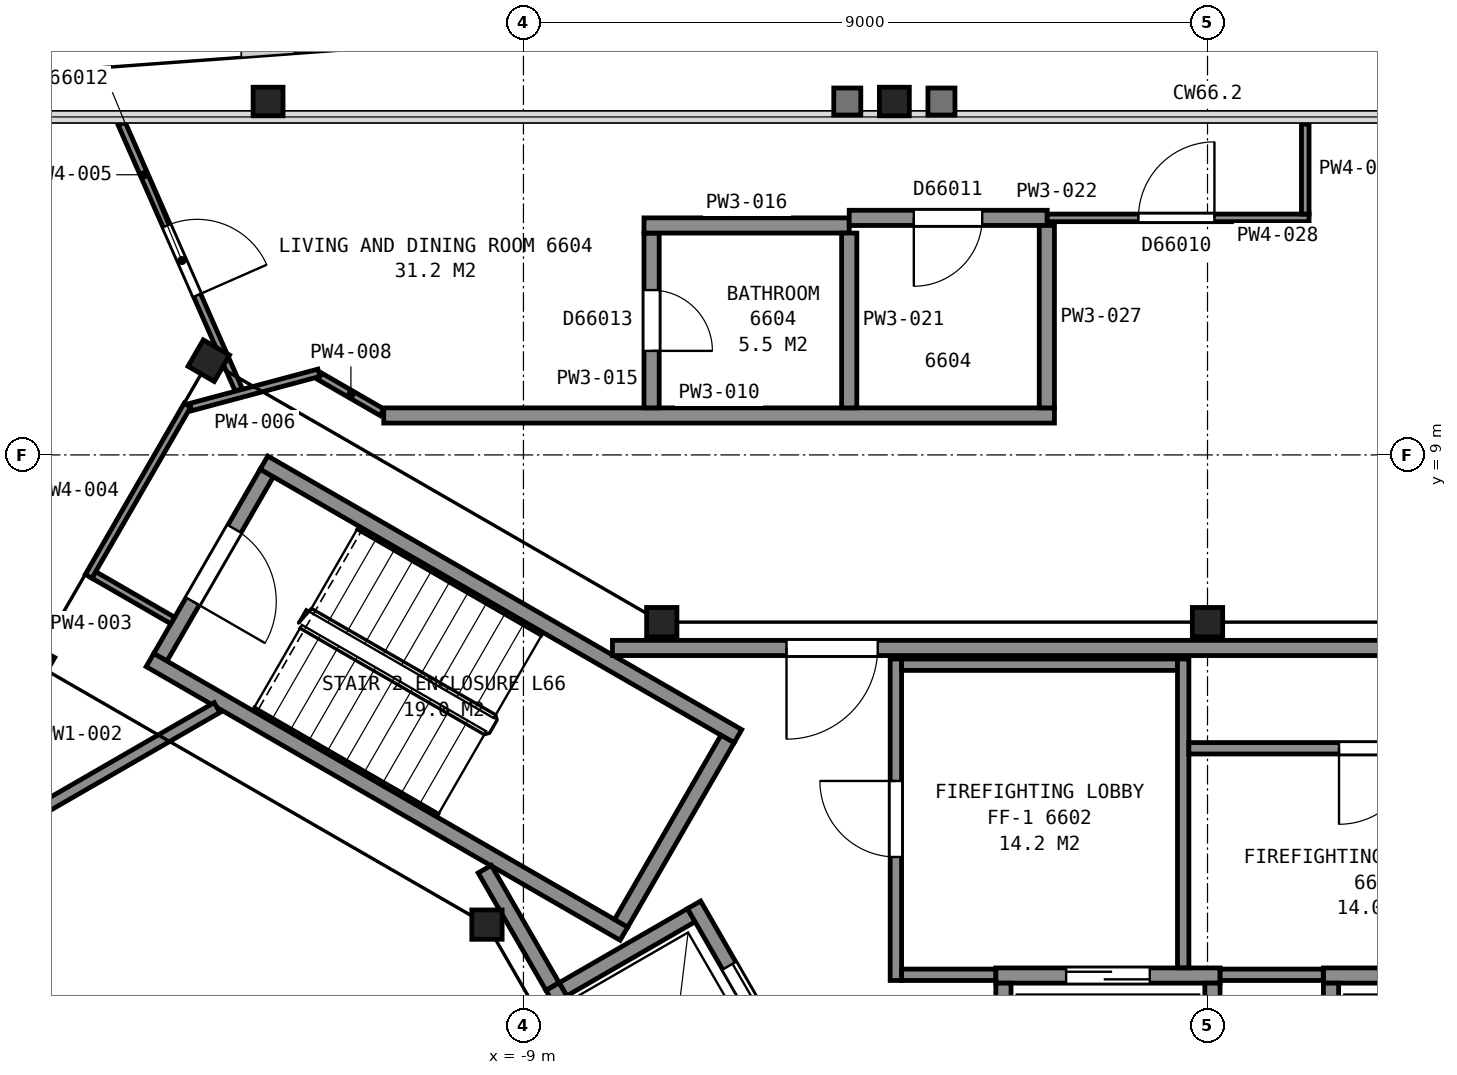
"""IFC4 building model, lengths in metres.
Left out: names, types, materials, properties, quantities, classifications, styles, units other than length and angle.
Written with IfcOpenShell. Run it as: python <this file> out.ifc"""

import sys

from ifc_helpers import new_model, si_unit, direction, frame, frame_2d, origin, origin_2d, place, context, subcontext, project, spatial, rectangle, i_section, extrude, element, fill, save


model = new_model("IFC4")
c1 = context("Model", 3, precision=1e-05, world=origin(), true_north=direction((0.0, 1.0)))
c2 = subcontext(c1, "Body", "Model", "MODEL_VIEW")
j1 = project(units=[si_unit("LENGTHUNIT", "METRE"), si_unit("PLANEANGLEUNIT", "RADIAN")], contexts=[c1])
p1 = place(None, origin())
s1 = spatial("IfcSite", under=j1, at=p1, CompositionType="ELEMENT")
p2 = place(p1, origin())
s2 = spatial("IfcBuilding", under=s1, at=p2, CompositionType="ELEMENT")
p3 = place(p2, frame((0.0, 0.0, 264.0)))
s3 = spatial("IfcBuildingStorey", under=s2, at=p3, CompositionType="ELEMENT", Elevation=264.0)
for number, where, z_axis, x_axis in (
    (1, (-4.12, 13.65, 0.0), (0.0, 0.0, 1.0), (1.0, 0.0, 0.0)),
    (2, (-12.36, 13.65, 0.0), (0.0, 0.0, 1.0), (1.0, 0.0, 0.0)),
):
    element("IfcColumn", number, at=place(p3, frame(where, z_axis=z_axis, x_axis=x_axis)), inside=s3, PredefinedType="COLUMN", context=c2, shape_type="SweptSolid", body=[
        extrude(i_section(OverallWidth=0.394, OverallDepth=0.376, WebThickness=0.017, FlangeThickness=0.028, FilletRadius=0.015, at=origin_2d()), origin(), (0.0, 0.0, 1.0), 3.7),
    ])
p4 = place(p3, frame((0.0, 6.8, 0.03), z_axis=(0.0, 0.0, 1.0), x_axis=(1.0, 0.0, 0.0)))
e3 = element("IfcColumn", 3, at=p4, inside=s3, PredefinedType="COLUMN", context=c2, shape_type="SweptSolid", body=[
    extrude(i_section(OverallWidth=0.399, OverallDepth=0.386, WebThickness=0.021, FlangeThickness=0.033, FilletRadius=0.015, at=origin_2d()), origin(), (0.0, 0.0, 1.0), 3.67),
])
p5 = place(p3, frame((-7.18, 6.8, 0.065), z_axis=(0.0, 0.0, 1.0), x_axis=(1.0, 0.0, 0.0)))
e4 = element("IfcColumn", 4, at=p5, inside=s3, PredefinedType="COLUMN", context=c2, shape_type="SweptSolid", body=[
    extrude(i_section(OverallWidth=0.399, OverallDepth=0.386, WebThickness=0.021, FlangeThickness=0.033, FilletRadius=0.015, at=origin_2d()), origin(), (0.0, 0.0, 1.0), 3.635),
])
for number, where, z_axis, x_axis in (
    (5, (-13.14, 10.24, 0.05), (0.0, 0.0, 1.0), (0.5, 0.866, 0.0)),
    (6, (-15.44, 6.26, 0.05), (0.0, 0.0, 1.0), (0.5, 0.866, 0.0)),
):
    element("IfcColumn", number, at=place(p3, frame(where, z_axis=z_axis, x_axis=x_axis)), inside=s3, PredefinedType="COLUMN", context=c2, shape_type="SweptSolid", body=[
        extrude(i_section(OverallWidth=0.401, OverallDepth=0.399, WebThickness=0.025, FlangeThickness=0.04, FilletRadius=0.015, at=origin_2d()), origin(), (0.0, 0.0, 1.0), 3.65),
    ])
p6 = place(p3, frame((-9.48, 2.82, 0.065), z_axis=(0.0, 0.0, 1.0), x_axis=(1.0, 0.0, 0.0)))
e7 = element("IfcColumn", 7, at=p6, inside=s3, PredefinedType="COLUMN", context=c2, shape_type="SweptSolid", body=[
    extrude(i_section(OverallWidth=0.399, OverallDepth=0.386, WebThickness=0.021, FlangeThickness=0.033, FilletRadius=0.015, at=origin_2d()), origin(), (0.0, 0.0, 1.0), 3.635),
])
p7 = place(p3, frame((-12.377, 8.762, 0.0), z_axis=(0.0, 0.0, 1.0), x_axis=(-0.500049511043, -0.865996816683, 0.0)))
e8 = element("IfcWall", 8, at=p7, inside=s3, PredefinedType="PARTITIONING", context=c2, shape_type="SweptSolid", body=[
    extrude(rectangle(XDim=2.8, YDim=0.2, at=frame_2d((1.4, 0.0))), origin(), (0.0, 0.0, 1.0), 3.45),
])
p8 = place(p7, frame((0.85, 0.0, 0.0)))
e9 = element("IfcOpeningElement", 9, at=p8, cuts=e8, PredefinedType="OPENING", context=c2, shape_type="SweptSolid", body=[
    extrude(rectangle(XDim=1.1, YDim=2.1, at=frame_2d((0.55, 1.05))), frame((0.0, 0.11, 0.0), z_axis=(0.0, -1.0, 0.0), x_axis=(1.0, 0.0, 0.0)), (0.0, 0.0, 1.0), 0.22),
])
for number, where, z_axis, x_axis in (
    (10, (-7.678, 2.701, 0.0), (0.0, 0.0, 1.0), (-0.866, 0.5, 0.0)),
    (11, (-6.178, 5.299, 0.0), (0.0, 0.0, 1.0), (-0.866, 0.5, 0.0)),
):
    element("IfcWall", number, at=place(p3, frame(where, z_axis=z_axis, x_axis=x_axis)), inside=s3, PredefinedType="PARTITIONING", context=c2, shape_type="SweptSolid", body=[
        extrude(rectangle(XDim=7.2, YDim=0.2, at=frame_2d((3.6, 0.0))), origin(), (0.0, 0.0, 1.0), 3.45),
    ])
p9 = place(p3, frame((-6.315, 5.262, 0.0), z_axis=(0.0, 0.0, 1.0), x_axis=(-0.500049511043, -0.865996816683, 0.0)))
e12 = element("IfcWall", 12, at=p9, inside=s3, PredefinedType="PARTITIONING", context=c2, shape_type="SweptSolid", body=[
    extrude(rectangle(XDim=2.8, YDim=0.2, at=frame_2d((1.4, 0.0))), origin(), (0.0, 0.0, 1.0), 3.45),
])
p10 = place(p3, frame((-2.785, 2.15, 0.0), z_axis=(0.0, 0.0, 1.0), x_axis=(1.0, 0.0, 0.0)))
e13 = element("IfcWall", 13, at=p10, inside=s3, PredefinedType="PARTITIONING", context=c2, shape_type="SweptSolid", body=[
    extrude(rectangle(XDim=2.95, YDim=0.2, at=frame_2d((1.475, 0.0))), origin(), (0.0, 0.0, 1.0), 3.7),
])
p11 = place(p10, frame((0.925, 0.0, 0.0)))
e14 = element("IfcOpeningElement", 14, at=p11, cuts=e13, PredefinedType="OPENING", context=c2, shape_type="SweptSolid", body=[
    extrude(rectangle(XDim=1.1, YDim=2.1, at=frame_2d((0.55, 1.05))), frame((0.0, 0.11, 0.0), z_axis=(0.0, -1.0, 0.0), x_axis=(1.0, 0.0, 0.0)), (0.0, 0.0, 1.0), 0.22),
])
p12 = place(p3, frame((1.525, 2.15, 0.0), z_axis=(0.0, 0.0, 1.0), x_axis=(1.0, 0.0, 0.0)))
e15 = element("IfcWall", 15, at=p12, inside=s3, PredefinedType="PARTITIONING", context=c2, shape_type="SweptSolid", body=[
    extrude(rectangle(XDim=2.95, YDim=0.2, at=frame_2d((1.475, 0.0))), origin(), (0.0, 0.0, 1.0), 3.7),
])
p13 = place(p12, frame((0.925, 0.0, 0.0)))
e16 = element("IfcOpeningElement", 16, at=p13, cuts=e15, PredefinedType="OPENING", context=c2, shape_type="SweptSolid", body=[
    extrude(rectangle(XDim=1.1, YDim=2.1, at=frame_2d((0.55, 1.05))), frame((0.0, 0.11, 0.0), z_axis=(0.0, -1.0, 0.0), x_axis=(1.0, 0.0, 0.0)), (0.0, 0.0, 1.0), 0.22),
])
for number, where, z_axis, x_axis in (
    (17, (-8.48, 1.969, 0.0), (0.0, 0.0, 1.0), (0.866, 0.5, 0.0)),
    (18, (1.625, 0.1, 0.0), (0.0, 0.0, 1.0), (0.0, 1.0, 0.0)),
    (19, (0.065, 0.1, 0.0), (0.0, 0.0, 1.0), (0.0, 1.0, 0.0)),
    (20, (-2.685, 0.1, 0.0), (0.0, 0.0, 1.0), (0.0, 1.0, 0.0)),
):
    element("IfcWall", number, at=place(p3, frame(where, z_axis=z_axis, x_axis=x_axis)), inside=s3, PredefinedType="PARTITIONING", context=c2, shape_type="SweptSolid", body=[
        extrude(rectangle(XDim=1.95, YDim=0.2, at=frame_2d((0.975, 0.0))), origin(), (0.0, 0.0, 1.0), 3.7),
    ])
p14 = place(p3, frame((-5.28, 0.525, 0.0), z_axis=(0.0, 0.0, 1.0), x_axis=(-0.500037662692, 0.866003658127, 0.0)))
e21 = element("IfcWall", 21, at=p14, inside=s3, PredefinedType="PARTITIONING", context=c2, shape_type="SweptSolid", body=[
    extrude(rectangle(XDim=2.95, YDim=0.2, at=frame_2d((1.475, 0.0))), origin(), (0.0, 0.0, 1.0), 3.7),
])
p15 = place(p14, frame((0.925, 0.0, 0.0)))
e22 = element("IfcOpeningElement", 22, at=p15, cuts=e21, PredefinedType="OPENING", context=c2, shape_type="SweptSolid", body=[
    extrude(rectangle(XDim=1.1, YDim=2.1, at=frame_2d((0.55, 1.05))), frame((0.0, 0.11, 0.0), z_axis=(0.0, -1.0, 0.0), x_axis=(1.0, 0.0, 0.0)), (0.0, 0.0, 1.0), 0.22),
])
p16 = place(p3, frame((-7.142, -0.55, 0.0), z_axis=(0.0, 0.0, 1.0), x_axis=(-0.49997559174, 0.866039495442, 0.0)))
e23 = element("IfcWall", 23, at=p16, inside=s3, PredefinedType="PARTITIONING", context=c2, shape_type="SweptSolid", body=[
    extrude(rectangle(XDim=2.95, YDim=0.2, at=frame_2d((1.475, 0.0))), origin(), (0.0, 0.0, 1.0), 3.7),
])
p17 = place(p3, frame((-9.509, 3.551, 0.0), z_axis=(0.0, 0.0, 1.0), x_axis=(0.499999136801, -0.866025902152, 0.0)))
e24 = element("IfcWall", 24, at=p17, inside=s3, PredefinedType="PARTITIONING", context=c2, shape_type="SweptSolid", body=[
    extrude(rectangle(XDim=1.782, YDim=0.2, at=frame_2d((0.891, 0.0))), origin(), (0.0, 0.0, 1.0), 3.45),
])
p18 = place(p3, frame((7.829, 6.46, 0.0), z_axis=(0.0, 0.0, 1.0), x_axis=(-1.0, 0.0, 0.0)))
e25 = element("IfcWall", 25, at=p18, inside=s3, PredefinedType="PARTITIONING", context=c2, shape_type="SweptSolid", body=[
    extrude(rectangle(XDim=15.658, YDim=0.2, at=frame_2d((7.829, 0.0))), origin(), (0.0, 0.0, 1.0), 3.45),
])
p19 = place(p18, frame((12.168, 0.0, 0.0)))
e26 = element("IfcOpeningElement", 26, at=p19, cuts=e25, PredefinedType="OPENING", context=c2, shape_type="SweptSolid", body=[
    extrude(rectangle(XDim=1.2, YDim=2.1, at=frame_2d((0.6, 1.05))), frame((0.0, 0.11, 0.0), z_axis=(0.0, -1.0, 0.0), x_axis=(1.0, 0.0, 0.0)), (0.0, 0.0, 1.0), 0.22),
])
p20 = place(p3, frame((-4.1, 2.085, 0.0), z_axis=(0.0, 0.0, 1.0), x_axis=(0.0, 1.0, 0.0)))
e27 = element("IfcWall", 27, at=p20, inside=s3, PredefinedType="PARTITIONING", context=c2, shape_type="SweptSolid", body=[
    extrude(rectangle(XDim=4.23, YDim=0.15, at=frame_2d((2.115, 0.0))), origin(), (0.0, 0.0, 1.0), 3.45),
])
p21 = place(p20, frame((1.625, 0.0, 0.0)))
e28 = element("IfcOpeningElement", 28, at=p21, cuts=e27, PredefinedType="OPENING", context=c2, shape_type="SweptSolid", body=[
    extrude(rectangle(XDim=1.0, YDim=2.1, at=frame_2d((0.5, 1.05))), frame((0.0, 0.085, 0.0), z_axis=(0.0, -1.0, 0.0), x_axis=(1.0, 0.0, 0.0)), (0.0, 0.0, 1.0), 0.17),
])
p22 = place(p3, frame((-4.025, 2.16, 0.0), z_axis=(0.0, 0.0, 1.0), x_axis=(1.0, 0.0, 0.0)))
e29 = element("IfcWall", 29, at=p22, inside=s3, PredefinedType="PARTITIONING", context=c2, shape_type="SweptSolid", body=[
    extrude(rectangle(XDim=1.238, YDim=0.15, at=frame_2d((0.619, 0.0))), origin(), (0.0, 0.0, 1.0), 3.45),
])
p23 = place(p3, frame((-4.025, 6.24, 0.0), z_axis=(0.0, 0.0, 1.0), x_axis=(1.0, 0.0, 0.0)))
e30 = element("IfcWall", 30, at=p23, inside=s3, PredefinedType="PARTITIONING", context=c2, shape_type="SweptSolid", body=[
    extrude(rectangle(XDim=3.63, YDim=0.15, at=frame_2d((1.815, 0.0))), origin(), (0.0, 0.0, 1.0), 3.45),
])
p24 = place(p3, frame((-0.32, 2.252, 0.0), z_axis=(0.0, 0.0, 1.0), x_axis=(0.0, 1.0, 0.0)))
e31 = element("IfcWall", 31, at=p24, inside=s3, PredefinedType="PARTITIONING", context=c2, shape_type="SweptSolid", body=[
    extrude(rectangle(XDim=4.063, YDim=0.15, at=frame_2d((2.031, 0.0))), origin(), (0.0, 0.0, 1.0), 3.45),
])
p25 = place(p3, frame((-0.245, 5.14, 0.0), z_axis=(0.0, 0.0, 1.0), x_axis=(1.0, 0.0, 0.0)))
e32 = element("IfcWall", 32, at=p25, inside=s3, PredefinedType="PARTITIONING", context=c2, shape_type="SweptSolid", body=[
    extrude(rectangle(XDim=5.11, YDim=0.15, at=frame_2d((2.555, 0.0))), origin(), (0.0, 0.0, 1.0), 3.45),
])
p26 = place(p25, frame((1.975, 0.0, 0.0)))
e33 = element("IfcOpeningElement", 33, at=p26, cuts=e32, PredefinedType="OPENING", context=c2, shape_type="SweptSolid", body=[
    extrude(rectangle(XDim=1.0, YDim=2.1, at=frame_2d((0.5, 1.05))), frame((0.0, 0.085, 0.0), z_axis=(0.0, -1.0, 0.0), x_axis=(1.0, 0.0, 0.0)), (0.0, 0.0, 1.0), 0.17),
])
p27 = place(p3, frame((0.167, 2.16, 0.0), z_axis=(0.0, 0.0, 1.0), x_axis=(1.0, 0.0, 0.0)))
e34 = element("IfcWall", 34, at=p27, inside=s3, PredefinedType="PARTITIONING", context=c2, shape_type="SweptSolid", body=[
    extrude(rectangle(XDim=1.356, YDim=0.15, at=frame_2d((0.678, 0.0))), origin(), (0.0, 0.0, 1.0), 3.45),
])
p28 = place(p3, frame((-15.489, 4.257, 0.0), z_axis=(0.0, 0.0, 1.0), x_axis=(0.866053804324, 0.499950805595, 0.0)))
e35 = element("IfcWall", 35, at=p28, inside=s3, PredefinedType="PARTITIONING", context=c2, shape_type="SweptSolid", body=[
    extrude(rectangle(XDim=2.838, YDim=0.15, at=frame_2d((1.419, 0.0))), origin(), (0.0, 0.0, 1.0), 2.723),
])
p29 = place(p3, frame((-14.653, 7.421, 0.0), z_axis=(0.0, 0.0, 1.0), x_axis=(0.865941482684, -0.500145327446, 0.0)))
e36 = element("IfcWall", 36, at=p29, inside=s3, PredefinedType="PARTITIONING", context=c2, shape_type="SweptSolid", body=[
    extrude(rectangle(XDim=1.199, YDim=0.1, at=frame_2d((0.6, 0.0))), origin(), (0.0, 0.0, 1.0), 2.723),
])
p30 = place(p3, frame((-14.721, 7.403, 0.0), z_axis=(0.0, 0.0, 1.0), x_axis=(0.500006934395, 0.866021400173, 0.0)))
e37 = element("IfcWall", 37, at=p30, inside=s3, PredefinedType="PARTITIONING", context=c2, shape_type="SweptSolid", body=[
    extrude(rectangle(XDim=2.6, YDim=0.1, at=frame_2d((1.3, 0.0))), origin(), (0.0, 0.0, 1.0), 2.723),
])
p31 = place(p3, frame((-12.747, 9.857, 0.0), z_axis=(0.0, 0.0, 1.0), x_axis=(-0.402509649346, 0.91541574281, 0.0)))
e38 = element("IfcWall", 38, at=p31, inside=s3, PredefinedType="PARTITIONING", context=c2, shape_type="SweptSolid", body=[
    extrude(rectangle(XDim=3.824, YDim=0.1, at=frame_2d((1.912, 0.0))), origin(), (0.0, 0.0, 1.0), 2.723),
])
p32 = place(p31, frame((1.357, 0.0, 0.0)))
e39 = element("IfcOpeningElement", 39, at=p32, cuts=e38, PredefinedType="OPENING", context=c2, shape_type="SweptSolid", body=[
    extrude(rectangle(XDim=1.0, YDim=2.1, at=frame_2d((0.5, 1.05))), frame((0.0, 0.06, 0.0), z_axis=(0.0, -1.0, 0.0), x_axis=(1.0, 0.0, 0.0)), (0.0, 0.0, 1.0), 0.12),
])
p33 = place(p3, frame((-13.378, 9.629, 0.0), z_axis=(0.0, 0.0, 1.0), x_axis=(0.966007272337, 0.258514892785, 0.0)))
e40 = element("IfcWall", 40, at=p33, inside=s3, PredefinedType="PARTITIONING", context=c2, shape_type="SweptSolid", body=[
    extrude(rectangle(XDim=1.747, YDim=0.1, at=frame_2d((0.874, 0.0))), origin(), (0.0, 0.0, 1.0), 2.723),
])
p34 = place(p3, frame((-11.678, 10.033, 0.0), z_axis=(0.0, 0.0, 1.0), x_axis=(0.866116627388, -0.499841962787, 0.0)))
e41 = element("IfcWall", 41, at=p34, inside=s3, PredefinedType="PARTITIONING", context=c2, shape_type="SweptSolid", body=[
    extrude(rectangle(XDim=0.943, YDim=0.1, at=frame_2d((0.472, 0.0))), origin(), (0.0, 0.0, 1.0), 2.723),
])
p35 = place(p3, frame((-10.838, 9.519, 0.0), z_axis=(0.0, 0.0, 1.0), x_axis=(1.0, 0.0, 0.0)))
e42 = element("IfcWall", 42, at=p35, inside=s3, PredefinedType="PARTITIONING", context=c2, shape_type="SweptSolid", body=[
    extrude(rectangle(XDim=8.824, YDim=0.2, at=frame_2d((4.412, 0.0))), origin(), (0.0, 0.0, 1.0), 2.723),
])
p36 = place(p3, frame((-7.314, 11.919, 0.0), z_axis=(0.0, 0.0, 1.0), x_axis=(0.0, -1.0, 0.0)))
e43 = element("IfcWall", 43, at=p36, inside=s3, PredefinedType="PARTITIONING", context=c2, shape_type="SweptSolid", body=[
    extrude(rectangle(XDim=2.3, YDim=0.2, at=frame_2d((1.15, 0.0))), origin(), (0.0, 0.0, 1.0), 2.723),
])
p37 = place(p36, frame((0.75, 0.0, 0.0)))
e44 = element("IfcOpeningElement", 44, at=p37, cuts=e43, PredefinedType="OPENING", context=c2, shape_type="SweptSolid", body=[
    extrude(rectangle(XDim=0.8, YDim=2.1, at=frame_2d((0.4, 1.05))), frame((0.0, 0.11, 0.0), z_axis=(0.0, -1.0, 0.0), x_axis=(1.0, 0.0, 0.0)), (0.0, 0.0, 1.0), 0.22),
])
p38 = place(p3, frame((-7.414, 12.019, 0.0), z_axis=(0.0, 0.0, 1.0), x_axis=(1.0, 0.0, 0.0)))
e45 = element("IfcWall", 45, at=p38, inside=s3, PredefinedType="PARTITIONING", context=c2, shape_type="SweptSolid", body=[
    extrude(rectangle(XDim=2.7, YDim=0.2, at=frame_2d((1.35, 0.0))), origin(), (0.0, 0.0, 1.0), 2.723),
])
p39 = place(p3, frame((-4.714, 9.619, 0.0), z_axis=(0.0, 0.0, 1.0), x_axis=(0.0, 1.0, 0.0)))
e46 = element("IfcWall", 46, at=p39, inside=s3, PredefinedType="PARTITIONING", context=c2, shape_type="SweptSolid", body=[
    extrude(rectangle(XDim=2.3, YDim=0.2, at=frame_2d((1.15, 0.0))), origin(), (0.0, 0.0, 1.0), 2.723),
])
p40 = place(p3, frame((-2.109, 12.119, 0.0), z_axis=(0.0, 0.0, 1.0), x_axis=(-1.0, 0.0, 0.0)))
e47 = element("IfcWall", 47, at=p40, inside=s3, PredefinedType="PARTITIONING", context=c2, shape_type="SweptSolid", body=[
    extrude(rectangle(XDim=2.605, YDim=0.2, at=frame_2d((1.303, 0.0))), origin(), (0.0, 0.0, 1.0), 2.723),
])
p41 = place(p40, frame((0.855, 0.0, 0.0)))
e48 = element("IfcOpeningElement", 48, at=p41, cuts=e47, PredefinedType="OPENING", context=c2, shape_type="SweptSolid", body=[
    extrude(rectangle(XDim=0.9, YDim=2.1, at=frame_2d((0.45, 1.05))), frame((0.0, 0.11, 0.0), z_axis=(0.0, -1.0, 0.0), x_axis=(1.0, 0.0, 0.0)), (0.0, 0.0, 1.0), 0.22),
])
p42 = place(p3, frame((-2.114, 9.619, 0.0), z_axis=(0.0, 0.0, 1.0), x_axis=(0.0, 1.0, 0.0)))
e49 = element("IfcWall", 49, at=p42, inside=s3, PredefinedType="PARTITIONING", context=c2, shape_type="SweptSolid", body=[
    extrude(rectangle(XDim=2.4, YDim=0.2, at=frame_2d((1.2, 0.0))), origin(), (0.0, 0.0, 1.0), 2.723),
])
p43 = place(p3, frame((-2.109, 12.119, 0.0), z_axis=(0.0, 0.0, 1.0), x_axis=(1.0, 0.0, 0.0)))
e50 = element("IfcWall", 50, at=p43, inside=s3, PredefinedType="PARTITIONING", context=c2, shape_type="SweptSolid", body=[
    extrude(rectangle(XDim=3.445, YDim=0.1, at=frame_2d((1.722, 0.0))), origin(), (0.0, 0.0, 1.0), 2.723),
])
p44 = place(p43, frame((1.2, 0.0, 0.0)))
e51 = element("IfcOpeningElement", 51, at=p44, cuts=e50, PredefinedType="OPENING", context=c2, shape_type="SweptSolid", body=[
    extrude(rectangle(XDim=1.0, YDim=2.1, at=frame_2d((0.5, 1.05))), frame((0.0, 0.06, 0.0), z_axis=(0.0, -1.0, 0.0), x_axis=(1.0, 0.0, 0.0)), (0.0, 0.0, 1.0), 0.12),
])
p45 = place(p3, frame((1.286, 12.169, 0.0), z_axis=(0.0, 0.0, 1.0), x_axis=(0.0, 1.0, 0.0)))
e52 = element("IfcWall", 52, at=p45, inside=s3, PredefinedType="PARTITIONING", context=c2, shape_type="SweptSolid", body=[
    extrude(rectangle(XDim=1.182, YDim=0.1, at=frame_2d((0.591, 0.0))), origin(), (0.0, 0.0, 1.0), 2.723),
])
p46 = place(p8, origin())
e53 = element("IfcDoor", 53, at=p46, inside=s3, OperationType="SINGLE_SWING_RIGHT", PredefinedType="DOOR", context=c2, shape_type="SweptSolid", body=[
    extrude(rectangle(XDim=1.1, YDim=2.1, at=frame_2d((0.55, 1.05))), frame((0.0, 0.025, 0.0), z_axis=(0.0, -1.0, 0.0), x_axis=(1.0, 0.0, 0.0)), (0.0, 0.0, 1.0), 0.05),
])
fill(e9, e53)
p47 = place(p11, origin())
e54 = element("IfcDoor", 54, at=p47, inside=s3, OperationType="SLIDING_TO_LEFT", PredefinedType="DOOR", context=c2, shape_type="SweptSolid", body=[
    extrude(rectangle(XDim=1.1, YDim=2.1, at=frame_2d((0.55, 1.05))), frame((0.0, 0.025, 0.0), z_axis=(0.0, -1.0, 0.0), x_axis=(1.0, 0.0, 0.0)), (0.0, 0.0, 1.0), 0.05),
])
fill(e14, e54)
p48 = place(p15, origin())
e55 = element("IfcDoor", 55, at=p48, inside=s3, OperationType="SLIDING_TO_LEFT", PredefinedType="DOOR", context=c2, shape_type="SweptSolid", body=[
    extrude(rectangle(XDim=1.1, YDim=2.1, at=frame_2d((0.55, 1.05))), frame((0.0, 0.025, 0.0), z_axis=(0.0, -1.0, 0.0), x_axis=(1.0, 0.0, 0.0)), (0.0, 0.0, 1.0), 0.05),
])
fill(e22, e55)
p49 = place(p19, origin())
e56 = element("IfcDoor", 56, at=p49, inside=s3, OperationType="SINGLE_SWING_RIGHT", PredefinedType="DOOR", context=c2, shape_type="SweptSolid", body=[
    extrude(rectangle(XDim=1.2, YDim=2.1, at=frame_2d((0.6, 1.05))), frame((0.0, 0.025, 0.0), z_axis=(0.0, -1.0, 0.0), x_axis=(1.0, 0.0, 0.0)), (0.0, 0.0, 1.0), 0.05),
])
fill(e26, e56)
p50 = place(p21, origin())
e57 = element("IfcDoor", 57, at=p50, inside=s3, OperationType="SINGLE_SWING_RIGHT", PredefinedType="DOOR", context=c2, shape_type="SweptSolid", body=[
    extrude(rectangle(XDim=1.0, YDim=2.1, at=frame_2d((0.5, 1.05))), frame((0.0, 0.025, 0.0), z_axis=(0.0, -1.0, 0.0), x_axis=(1.0, 0.0, 0.0)), (0.0, 0.0, 1.0), 0.05),
])
fill(e28, e57)
p51 = place(p26, origin())
e58 = element("IfcDoor", 58, at=p51, inside=s3, OperationType="SINGLE_SWING_LEFT", PredefinedType="DOOR", context=c2, shape_type="SweptSolid", body=[
    extrude(rectangle(XDim=1.0, YDim=2.1, at=frame_2d((0.5, 1.05))), frame((0.0, 0.025, 0.0), z_axis=(0.0, -1.0, 0.0), x_axis=(1.0, 0.0, 0.0)), (0.0, 0.0, 1.0), 0.05),
])
fill(e33, e58)
p52 = place(p32, origin())
e59 = element("IfcDoor", 59, at=p52, inside=s3, OperationType="SINGLE_SWING_LEFT", PredefinedType="DOOR", context=c2, shape_type="SweptSolid", body=[
    extrude(rectangle(XDim=1.0, YDim=2.1, at=frame_2d((0.5, 1.05))), frame((0.0, 0.025, 0.0), z_axis=(0.0, -1.0, 0.0), x_axis=(1.0, 0.0, 0.0)), (0.0, 0.0, 1.0), 0.05),
])
fill(e39, e59)
p53 = place(p37, origin())
e60 = element("IfcDoor", 60, at=p53, inside=s3, OperationType="SINGLE_SWING_RIGHT", PredefinedType="DOOR", context=c2, shape_type="SweptSolid", body=[
    extrude(rectangle(XDim=0.8, YDim=2.1, at=frame_2d((0.4, 1.05))), frame((0.0, 0.025, 0.0), z_axis=(0.0, -1.0, 0.0), x_axis=(1.0, 0.0, 0.0)), (0.0, 0.0, 1.0), 0.05),
])
fill(e44, e60)
p54 = place(p41, origin())
e61 = element("IfcDoor", 61, at=p54, inside=s3, OperationType="SINGLE_SWING_RIGHT", PredefinedType="DOOR", context=c2, shape_type="SweptSolid", body=[
    extrude(rectangle(XDim=0.9, YDim=2.1, at=frame_2d((0.45, 1.05))), frame((0.0, 0.025, 0.0), z_axis=(0.0, -1.0, 0.0), x_axis=(1.0, 0.0, 0.0)), (0.0, 0.0, 1.0), 0.05),
])
fill(e48, e61)
p55 = place(p44, origin())
e62 = element("IfcDoor", 62, at=p55, inside=s3, OperationType="SINGLE_SWING_RIGHT", PredefinedType="DOOR", context=c2, shape_type="SweptSolid", body=[
    extrude(rectangle(XDim=1.0, YDim=2.1, at=frame_2d((0.5, 1.05))), frame((0.0, 0.025, 0.0), z_axis=(0.0, -1.0, 0.0), x_axis=(1.0, 0.0, 0.0)), (0.0, 0.0, 1.0), 0.05),
])
fill(e51, e62)
save(model, sys.argv[1])
